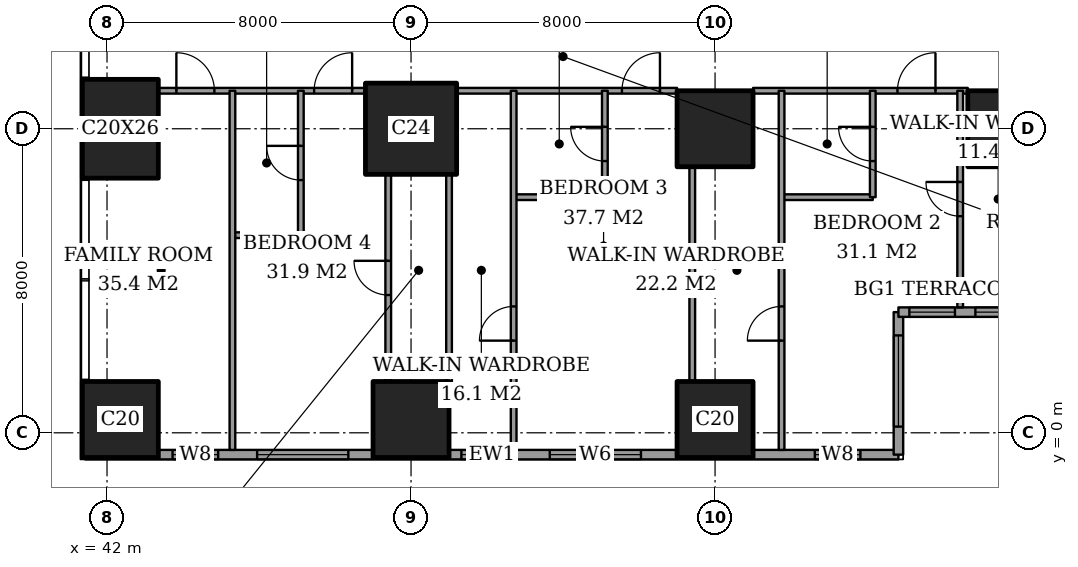
"""IFC4 building model, lengths in metres.
Left out: names, types, materials, properties, quantities, classifications, styles, units other than length and angle.
Written with IfcOpenShell. Run it as: python <this file> out.ifc"""

import sys

from ifc_helpers import new_model, si_unit, direction, frame, frame_2d, origin, origin_2d, place, context, subcontext, project, spatial, rectangle, extrude, element, fill, save


model = new_model("IFC4")
c1 = context("Model", 3, precision=1e-05, world=origin(), true_north=direction((0.0, 1.0)))
c2 = subcontext(c1, "Body", "Model", "MODEL_VIEW")
j1 = project(units=[si_unit("LENGTHUNIT", "METRE"), si_unit("PLANEANGLEUNIT", "RADIAN")], contexts=[c1])
p1 = place(None, origin())
s1 = spatial("IfcSite", under=j1, at=p1, CompositionType="ELEMENT")
p2 = place(p1, origin())
s2 = spatial("IfcBuilding", under=s1, at=p2, CompositionType="ELEMENT")
p3 = place(p2, frame((0.0, 0.0, 47.6)))
s3 = spatial("IfcBuildingStorey", under=s2, at=p3, CompositionType="ELEMENT", Elevation=47.6)
p4 = place(p3, frame((42.35, 0.35, 0.0), z_axis=(0.0, 0.0, 1.0), x_axis=(1.0, 0.0, 0.0)))
e1 = element("IfcColumn", 1, at=p4, inside=s3, PredefinedType="COLUMN", context=c2, shape_type="SweptSolid", body=[
    extrude(rectangle(XDim=2.0, YDim=2.0, at=origin_2d()), origin(), (0.0, 0.0, 1.0), 3.6),
])
p5 = place(p3, frame((42.35, 8.0, 0.0), z_axis=(0.0, 0.0, 1.0), x_axis=(1.0, 0.0, 0.0)))
e2 = element("IfcColumn", 2, at=p5, inside=s3, PredefinedType="COLUMN", context=c2, shape_type="SweptSolid", body=[
    extrude(rectangle(XDim=2.0, YDim=2.6, at=origin_2d()), origin(), (0.0, 0.0, 1.0), 3.6),
])
p6 = place(p3, frame((50.0, 0.35, 0.0), z_axis=(0.0, 0.0, 1.0), x_axis=(1.0, 0.0, 0.0)))
e3 = element("IfcColumn", 3, at=p6, inside=s3, PredefinedType="COLUMN", context=c2, shape_type="SweptSolid", body=[
    extrude(rectangle(XDim=2.0, YDim=2.0, at=origin_2d()), origin(), (0.0, 0.0, 1.0), 3.6),
])
p7 = place(p3, frame((50.0, 8.0, 0.0), z_axis=(0.0, 0.0, 1.0), x_axis=(1.0, 0.0, 0.0)))
e4 = element("IfcColumn", 4, at=p7, inside=s3, PredefinedType="COLUMN", context=c2, shape_type="SweptSolid", body=[
    extrude(rectangle(XDim=2.4, YDim=2.4, at=origin_2d()), origin(), (0.0, 0.0, 1.0), 3.6),
])
for number, where, z_axis, x_axis in (
    (5, (58.0, 0.35, 0.0), (0.0, 0.0, 1.0), (1.0, 0.0, 0.0)),
    (6, (58.0, 8.0, 0.0), (0.0, 0.0, 1.0), (1.0, 0.0, 0.0)),
    (7, (65.65, 8.0, 0.0), (0.0, 0.0, 1.0), (1.0, 0.0, 0.0)),
):
    element("IfcColumn", number, at=place(p3, frame(where, z_axis=z_axis, x_axis=x_axis)), inside=s3, PredefinedType="COLUMN", context=c2, shape_type="SweptSolid", body=[
        extrude(rectangle(XDim=2.0, YDim=2.0, at=origin_2d()), origin(), (0.0, 0.0, 1.0), 3.6),
    ])
p8 = place(p3, frame((41.425, -0.575, 0.0), z_axis=(0.0, 0.0, 1.0), x_axis=(1.0, 0.0, 0.0)))
e8 = element("IfcWall", 8, at=p8, inside=s3, PredefinedType="SOLIDWALL", context=c2, shape_type="SweptSolid", body=[
    extrude(rectangle(XDim=21.4, YDim=0.25, at=frame_2d((10.7, 0.0))), origin(), (0.0, 0.0, 1.0), 3.6),
])
p9 = place(p8, frame((2.3, 0.0, 0.6)))
e9 = element("IfcOpeningElement", 9, at=p9, cuts=e8, PredefinedType="OPENING", context=c2, shape_type="SweptSolid", body=[
    extrude(rectangle(XDim=1.2, YDim=2.0, at=frame_2d((0.6, 1.0))), frame((0.0, 0.135, 0.0), z_axis=(0.0, -1.0, 0.0), x_axis=(1.0, 0.0, 0.0)), (0.0, 0.0, 1.0), 0.27),
])
p10 = place(p8, frame((4.525, 0.0, 0.6)))
e10 = element("IfcOpeningElement", 10, at=p10, cuts=e8, PredefinedType="OPENING", context=c2, shape_type="SweptSolid", body=[
    extrude(rectangle(XDim=2.4, YDim=2.0, at=frame_2d((1.2, 1.0))), frame((0.0, 0.135, 0.0), z_axis=(0.0, -1.0, 0.0), x_axis=(1.0, 0.0, 0.0)), (0.0, 0.0, 1.0), 0.27),
])
p11 = place(p8, frame((9.9, 0.0, 0.6)))
e11 = element("IfcOpeningElement", 11, at=p11, cuts=e8, PredefinedType="OPENING", context=c2, shape_type="SweptSolid", body=[
    extrude(rectangle(XDim=1.2, YDim=2.0, at=frame_2d((0.6, 1.0))), frame((0.0, 0.135, 0.0), z_axis=(0.0, -1.0, 0.0), x_axis=(1.0, 0.0, 0.0)), (0.0, 0.0, 1.0), 0.27),
])
p12 = place(p8, frame((12.225, 0.0, 0.6)))
e12 = element("IfcOpeningElement", 12, at=p12, cuts=e8, PredefinedType="OPENING", context=c2, shape_type="SweptSolid", body=[
    extrude(rectangle(XDim=2.4, YDim=2.0, at=frame_2d((1.2, 1.0))), frame((0.0, 0.135, 0.0), z_axis=(0.0, -1.0, 0.0), x_axis=(1.0, 0.0, 0.0)), (0.0, 0.0, 1.0), 0.27),
])
p13 = place(p8, frame((19.2, 0.0, 0.6)))
e13 = element("IfcOpeningElement", 13, at=p13, cuts=e8, PredefinedType="OPENING", context=c2, shape_type="SweptSolid", body=[
    extrude(rectangle(XDim=1.2, YDim=2.0, at=frame_2d((0.6, 1.0))), frame((0.0, 0.135, 0.0), z_axis=(0.0, -1.0, 0.0), x_axis=(1.0, 0.0, 0.0)), (0.0, 0.0, 1.0), 0.27),
])
p14 = place(p3, frame((62.825, -0.575, 0.0), z_axis=(0.0, 0.0, 1.0), x_axis=(0.0, 1.0, 0.0)))
e14 = element("IfcWall", 14, at=p14, inside=s3, PredefinedType="SOLIDWALL", context=c2, shape_type="SweptSolid", body=[
    extrude(rectangle(XDim=3.75, YDim=0.25, at=frame_2d((1.875, 0.0))), origin(), (0.0, 0.0, 1.0), 3.6),
])
p15 = place(p14, frame((0.738, 0.0, 0.6)))
e15 = element("IfcOpeningElement", 15, at=p15, cuts=e14, PredefinedType="OPENING", context=c2, shape_type="SweptSolid", body=[
    extrude(rectangle(XDim=2.4, YDim=2.0, at=frame_2d((1.2, 1.0))), frame((0.0, 0.135, 0.0), z_axis=(0.0, -1.0, 0.0), x_axis=(1.0, 0.0, 0.0)), (0.0, 0.0, 1.0), 0.27),
])
p16 = place(p3, frame((62.825, 3.175, 0.0), z_axis=(0.0, 0.0, 1.0), x_axis=(1.0, 0.0, 0.0)))
e16 = element("IfcWall", 16, at=p16, inside=s3, PredefinedType="SOLIDWALL", context=c2, shape_type="SweptSolid", body=[
    extrude(rectangle(XDim=3.75, YDim=0.25, at=frame_2d((1.875, 0.0))), origin(), (0.0, 0.0, 1.0), 3.6),
])
p17 = place(p16, frame((0.288, 0.0, 0.6)))
e17 = element("IfcOpeningElement", 17, at=p17, cuts=e16, PredefinedType="OPENING", context=c2, shape_type="SweptSolid", body=[
    extrude(rectangle(XDim=1.2, YDim=2.0, at=frame_2d((0.6, 1.0))), frame((0.0, 0.135, 0.0), z_axis=(0.0, -1.0, 0.0), x_axis=(1.0, 0.0, 0.0)), (0.0, 0.0, 1.0), 0.27),
])
p18 = place(p16, frame((2.025, 0.0, 0.6)))
e18 = element("IfcOpeningElement", 18, at=p18, cuts=e16, PredefinedType="OPENING", context=c2, shape_type="SweptSolid", body=[
    extrude(rectangle(XDim=1.2, YDim=2.0, at=frame_2d((0.6, 1.0))), frame((0.0, 0.135, 0.0), z_axis=(0.0, -1.0, 0.0), x_axis=(1.0, 0.0, 0.0)), (0.0, 0.0, 1.0), 0.27),
])
p19 = place(p3, frame((45.3, 5.2, 0.0), z_axis=(0.0, 0.0, 1.0), x_axis=(1.0, 0.0, 0.0)))
e19 = element("IfcWall", 19, at=p19, inside=s3, PredefinedType="PARTITIONING", context=c2, shape_type="SweptSolid", body=[
    extrude(rectangle(XDim=1.8, YDim=0.15, at=frame_2d((0.9, 0.0))), origin(), (0.0, 0.0, 1.0), 3.35),
])
p20 = place(p3, frame((52.7, 6.2, 0.0), z_axis=(0.0, 0.0, 1.0), x_axis=(1.0, 0.0, 0.0)))
e20 = element("IfcWall", 20, at=p20, inside=s3, PredefinedType="PARTITIONING", context=c2, shape_type="SweptSolid", body=[
    extrude(rectangle(XDim=2.4, YDim=0.15, at=frame_2d((1.2, 0.0))), origin(), (0.0, 0.0, 1.0), 3.35),
])
p21 = place(p3, frame((59.75, 6.2, 0.0), z_axis=(0.0, 0.0, 1.0), x_axis=(1.0, 0.0, 0.0)))
e21 = element("IfcWall", 21, at=p21, inside=s3, PredefinedType="PARTITIONING", context=c2, shape_type="SweptSolid", body=[
    extrude(rectangle(XDim=2.4, YDim=0.15, at=frame_2d((1.2, 0.0))), origin(), (0.0, 0.0, 1.0), 3.35),
])
p22 = place(p3, frame((43.35, 9.0, 0.0), z_axis=(0.0, 0.0, 1.0), x_axis=(1.0, 0.0, 0.0)))
e22 = element("IfcWall", 22, at=p22, inside=s3, PredefinedType="PARTITIONING", context=c2, shape_type="SweptSolid", body=[
    extrude(rectangle(XDim=5.45, YDim=0.15, at=frame_2d((2.725, 0.0))), origin(), (0.0, 0.0, 1.0), 3.35),
])
p23 = place(p22, frame((4.1, 0.0, 0.0)))
e23 = element("IfcOpeningElement", 23, at=p23, cuts=e22, PredefinedType="OPENING", context=c2, shape_type="SweptSolid", body=[
    extrude(rectangle(XDim=1.0, YDim=2.1, at=frame_2d((0.5, 1.05))), frame((0.0, 0.085, 0.0), z_axis=(0.0, -1.0, 0.0), x_axis=(1.0, 0.0, 0.0)), (0.0, 0.0, 1.0), 0.17),
])
p24 = place(p22, frame((0.475, 0.0, 0.0)))
e24 = element("IfcOpeningElement", 24, at=p24, cuts=e22, PredefinedType="OPENING", context=c2, shape_type="SweptSolid", body=[
    extrude(rectangle(XDim=1.0, YDim=2.1, at=frame_2d((0.5, 1.05))), frame((0.0, 0.085, 0.0), z_axis=(0.0, -1.0, 0.0), x_axis=(1.0, 0.0, 0.0)), (0.0, 0.0, 1.0), 0.17),
])
p25 = place(p3, frame((51.2, 9.0, 0.0), z_axis=(0.0, 0.0, 1.0), x_axis=(1.0, 0.0, 0.0)))
e25 = element("IfcWall", 25, at=p25, inside=s3, PredefinedType="PARTITIONING", context=c2, shape_type="SweptSolid", body=[
    extrude(rectangle(XDim=5.8, YDim=0.15, at=frame_2d((2.9, 0.0))), origin(), (0.0, 0.0, 1.0), 3.35),
])
p26 = place(p25, frame((4.35, 0.0, 0.0)))
e26 = element("IfcOpeningElement", 26, at=p26, cuts=e25, PredefinedType="OPENING", context=c2, shape_type="SweptSolid", body=[
    extrude(rectangle(XDim=1.0, YDim=2.1, at=frame_2d((0.5, 1.05))), frame((0.0, 0.085, 0.0), z_axis=(0.0, -1.0, 0.0), x_axis=(1.0, 0.0, 0.0)), (0.0, 0.0, 1.0), 0.17),
])
p27 = place(p3, frame((59.0, 9.0, 0.0), z_axis=(0.0, 0.0, 1.0), x_axis=(1.0, 0.0, 0.0)))
e27 = element("IfcWall", 27, at=p27, inside=s3, PredefinedType="PARTITIONING", context=c2, shape_type="SweptSolid", body=[
    extrude(rectangle(XDim=5.65, YDim=0.15, at=frame_2d((2.825, 0.0))), origin(), (0.0, 0.0, 1.0), 3.35),
])
p28 = place(p27, frame((3.8, 0.0, 0.0)))
e28 = element("IfcOpeningElement", 28, at=p28, cuts=e27, PredefinedType="OPENING", context=c2, shape_type="SweptSolid", body=[
    extrude(rectangle(XDim=1.0, YDim=2.1, at=frame_2d((0.5, 1.05))), frame((0.0, 0.085, 0.0), z_axis=(0.0, -1.0, 0.0), x_axis=(1.0, 0.0, 0.0)), (0.0, 0.0, 1.0), 0.17),
])
p29 = place(p3, frame((45.3, -0.45, 0.0), z_axis=(0.0, 0.0, 1.0), x_axis=(0.0, 1.0, 0.0)))
e29 = element("IfcWall", 29, at=p29, inside=s3, PredefinedType="PARTITIONING", context=c2, shape_type="SweptSolid", body=[
    extrude(rectangle(XDim=9.45, YDim=0.15, at=frame_2d((4.725, 0.0))), origin(), (0.0, 0.0, 1.0), 3.35),
])
p30 = place(p3, frame((47.1, 5.2, 0.0), z_axis=(0.0, 0.0, 1.0), x_axis=(0.0, 1.0, 0.0)))
e30 = element("IfcWall", 30, at=p30, inside=s3, PredefinedType="PARTITIONING", context=c2, shape_type="SweptSolid", body=[
    extrude(rectangle(XDim=3.8, YDim=0.15, at=frame_2d((1.9, 0.0))), origin(), (0.0, 0.0, 1.0), 3.35),
])
p31 = place(p30, frame((1.45, 0.0, 0.0)))
e31 = element("IfcOpeningElement", 31, at=p31, cuts=e30, PredefinedType="OPENING", context=c2, shape_type="SweptSolid", body=[
    extrude(rectangle(XDim=0.9, YDim=2.1, at=frame_2d((0.45, 1.05))), frame((0.0, 0.085, 0.0), z_axis=(0.0, -1.0, 0.0), x_axis=(1.0, 0.0, 0.0)), (0.0, 0.0, 1.0), 0.17),
])
p32 = place(p3, frame((49.4, 1.35, 0.0), z_axis=(0.0, 0.0, 1.0), x_axis=(0.0, 1.0, 0.0)))
e32 = element("IfcWall", 32, at=p32, inside=s3, PredefinedType="PARTITIONING", context=c2, shape_type="SweptSolid", body=[
    extrude(rectangle(XDim=5.45, YDim=0.15, at=frame_2d((2.725, 0.0))), origin(), (0.0, 0.0, 1.0), 3.35),
])
p33 = place(p32, frame((2.275, 0.0, 0.0)))
e33 = element("IfcOpeningElement", 33, at=p33, cuts=e32, PredefinedType="OPENING", context=c2, shape_type="SweptSolid", body=[
    extrude(rectangle(XDim=0.9, YDim=2.1, at=frame_2d((0.45, 1.05))), frame((0.0, 0.085, 0.0), z_axis=(0.0, -1.0, 0.0), x_axis=(1.0, 0.0, 0.0)), (0.0, 0.0, 1.0), 0.17),
])
p34 = place(p3, frame((51.0, 1.35, 0.0), z_axis=(0.0, 0.0, 1.0), x_axis=(0.0, 1.0, 0.0)))
e34 = element("IfcWall", 34, at=p34, inside=s3, PredefinedType="PARTITIONING", context=c2, shape_type="SweptSolid", body=[
    extrude(rectangle(XDim=5.45, YDim=0.15, at=frame_2d((2.725, 0.0))), origin(), (0.0, 0.0, 1.0), 3.35),
])
p35 = place(p3, frame((52.7, -0.45, 0.0), z_axis=(0.0, 0.0, 1.0), x_axis=(0.0, 1.0, 0.0)))
e35 = element("IfcWall", 35, at=p35, inside=s3, PredefinedType="PARTITIONING", context=c2, shape_type="SweptSolid", body=[
    extrude(rectangle(XDim=9.45, YDim=0.15, at=frame_2d((4.725, 0.0))), origin(), (0.0, 0.0, 1.0), 3.35),
])
p36 = place(p35, frame((2.875, 0.0, 0.0)))
e36 = element("IfcOpeningElement", 36, at=p36, cuts=e35, PredefinedType="OPENING", context=c2, shape_type="SweptSolid", body=[
    extrude(rectangle(XDim=0.9, YDim=2.1, at=frame_2d((0.45, 1.05))), frame((0.0, 0.085, 0.0), z_axis=(0.0, -1.0, 0.0), x_axis=(1.0, 0.0, 0.0)), (0.0, 0.0, 1.0), 0.17),
])
p37 = place(p3, frame((55.1, 6.2, 0.0), z_axis=(0.0, 0.0, 1.0), x_axis=(0.0, 1.0, 0.0)))
e37 = element("IfcWall", 37, at=p37, inside=s3, PredefinedType="PARTITIONING", context=c2, shape_type="SweptSolid", body=[
    extrude(rectangle(XDim=2.8, YDim=0.15, at=frame_2d((1.4, 0.0))), origin(), (0.0, 0.0, 1.0), 3.35),
])
p38 = place(p37, frame((0.95, 0.0, 0.0)))
e38 = element("IfcOpeningElement", 38, at=p38, cuts=e37, PredefinedType="OPENING", context=c2, shape_type="SweptSolid", body=[
    extrude(rectangle(XDim=0.9, YDim=2.1, at=frame_2d((0.45, 1.05))), frame((0.0, 0.085, 0.0), z_axis=(0.0, -1.0, 0.0), x_axis=(1.0, 0.0, 0.0)), (0.0, 0.0, 1.0), 0.17),
])
p39 = place(p3, frame((57.4, 1.35, 0.0), z_axis=(0.0, 0.0, 1.0), x_axis=(0.0, 1.0, 0.0)))
e39 = element("IfcWall", 39, at=p39, inside=s3, PredefinedType="PARTITIONING", context=c2, shape_type="SweptSolid", body=[
    extrude(rectangle(XDim=5.65, YDim=0.15, at=frame_2d((2.825, 0.0))), origin(), (0.0, 0.0, 1.0), 3.35),
])
p40 = place(p3, frame((59.75, -0.45, 0.0), z_axis=(0.0, 0.0, 1.0), x_axis=(0.0, 1.0, 0.0)))
e40 = element("IfcWall", 40, at=p40, inside=s3, PredefinedType="PARTITIONING", context=c2, shape_type="SweptSolid", body=[
    extrude(rectangle(XDim=9.45, YDim=0.15, at=frame_2d((4.725, 0.0))), origin(), (0.0, 0.0, 1.0), 3.35),
])
p41 = place(p40, frame((2.875, 0.0, 0.0)))
e41 = element("IfcOpeningElement", 41, at=p41, cuts=e40, PredefinedType="OPENING", context=c2, shape_type="SweptSolid", body=[
    extrude(rectangle(XDim=0.9, YDim=2.1, at=frame_2d((0.45, 1.05))), frame((0.0, 0.085, 0.0), z_axis=(0.0, -1.0, 0.0), x_axis=(1.0, 0.0, 0.0)), (0.0, 0.0, 1.0), 0.17),
])
p42 = place(p3, frame((62.15, 6.2, 0.0), z_axis=(0.0, 0.0, 1.0), x_axis=(0.0, 1.0, 0.0)))
e42 = element("IfcWall", 42, at=p42, inside=s3, PredefinedType="PARTITIONING", context=c2, shape_type="SweptSolid", body=[
    extrude(rectangle(XDim=2.8, YDim=0.15, at=frame_2d((1.4, 0.0))), origin(), (0.0, 0.0, 1.0), 3.35),
])
p43 = place(p42, frame((0.95, 0.0, 0.0)))
e43 = element("IfcOpeningElement", 43, at=p43, cuts=e42, PredefinedType="OPENING", context=c2, shape_type="SweptSolid", body=[
    extrude(rectangle(XDim=0.9, YDim=2.1, at=frame_2d((0.45, 1.05))), frame((0.0, 0.085, 0.0), z_axis=(0.0, -1.0, 0.0), x_axis=(1.0, 0.0, 0.0)), (0.0, 0.0, 1.0), 0.17),
])
p44 = place(p3, frame((64.45, 3.3, 0.0), z_axis=(0.0, 0.0, 1.0), x_axis=(0.0, 1.0, 0.0)))
e44 = element("IfcWall", 44, at=p44, inside=s3, PredefinedType="PARTITIONING", context=c2, shape_type="SweptSolid", body=[
    extrude(rectangle(XDim=5.7, YDim=0.15, at=frame_2d((2.85, 0.0))), origin(), (0.0, 0.0, 1.0), 3.35),
])
p45 = place(p44, frame((2.4, 0.0, 0.0)))
e45 = element("IfcOpeningElement", 45, at=p45, cuts=e44, PredefinedType="OPENING", context=c2, shape_type="SweptSolid", body=[
    extrude(rectangle(XDim=0.9, YDim=2.1, at=frame_2d((0.45, 1.05))), frame((0.0, 0.085, 0.0), z_axis=(0.0, -1.0, 0.0), x_axis=(1.0, 0.0, 0.0)), (0.0, 0.0, 1.0), 0.17),
])
p46 = place(p9, origin())
e46 = element("IfcWindow", 46, at=p46, inside=s3, PartitioningType="SINGLE_PANEL", PredefinedType="WINDOW", context=c2, shape_type="SweptSolid", body=[
    extrude(rectangle(XDim=1.2, YDim=2.0, at=frame_2d((0.6, 1.0))), frame((0.0, 0.03, 0.0), z_axis=(0.0, -1.0, 0.0), x_axis=(1.0, 0.0, 0.0)), (0.0, 0.0, 1.0), 0.06),
])
fill(e9, e46)
p47 = place(p10, origin())
e47 = element("IfcWindow", 47, at=p47, inside=s3, PartitioningType="SINGLE_PANEL", PredefinedType="WINDOW", context=c2, shape_type="SweptSolid", body=[
    extrude(rectangle(XDim=2.4, YDim=2.0, at=frame_2d((1.2, 1.0))), frame((0.0, 0.03, 0.0), z_axis=(0.0, -1.0, 0.0), x_axis=(1.0, 0.0, 0.0)), (0.0, 0.0, 1.0), 0.06),
])
fill(e10, e47)
p48 = place(p11, origin())
e48 = element("IfcWindow", 48, at=p48, inside=s3, PartitioningType="SINGLE_PANEL", PredefinedType="WINDOW", context=c2, shape_type="SweptSolid", body=[
    extrude(rectangle(XDim=1.2, YDim=2.0, at=frame_2d((0.6, 1.0))), frame((0.0, 0.03, 0.0), z_axis=(0.0, -1.0, 0.0), x_axis=(1.0, 0.0, 0.0)), (0.0, 0.0, 1.0), 0.06),
])
fill(e11, e48)
p49 = place(p12, origin())
e49 = element("IfcWindow", 49, at=p49, inside=s3, PartitioningType="SINGLE_PANEL", PredefinedType="WINDOW", context=c2, shape_type="SweptSolid", body=[
    extrude(rectangle(XDim=2.4, YDim=2.0, at=frame_2d((1.2, 1.0))), frame((0.0, 0.03, 0.0), z_axis=(0.0, -1.0, 0.0), x_axis=(1.0, 0.0, 0.0)), (0.0, 0.0, 1.0), 0.06),
])
fill(e12, e49)
p50 = place(p13, origin())
e50 = element("IfcWindow", 50, at=p50, inside=s3, PartitioningType="SINGLE_PANEL", PredefinedType="WINDOW", context=c2, shape_type="SweptSolid", body=[
    extrude(rectangle(XDim=1.2, YDim=2.0, at=frame_2d((0.6, 1.0))), frame((0.0, 0.03, 0.0), z_axis=(0.0, -1.0, 0.0), x_axis=(1.0, 0.0, 0.0)), (0.0, 0.0, 1.0), 0.06),
])
fill(e13, e50)
p51 = place(p15, origin())
e51 = element("IfcWindow", 51, at=p51, inside=s3, PartitioningType="SINGLE_PANEL", PredefinedType="WINDOW", context=c2, shape_type="SweptSolid", body=[
    extrude(rectangle(XDim=2.4, YDim=2.0, at=frame_2d((1.2, 1.0))), frame((0.0, 0.03, 0.0), z_axis=(0.0, -1.0, 0.0), x_axis=(1.0, 0.0, 0.0)), (0.0, 0.0, 1.0), 0.06),
])
fill(e15, e51)
p52 = place(p17, origin())
e52 = element("IfcWindow", 52, at=p52, inside=s3, PartitioningType="SINGLE_PANEL", PredefinedType="WINDOW", context=c2, shape_type="SweptSolid", body=[
    extrude(rectangle(XDim=1.2, YDim=2.0, at=frame_2d((0.6, 1.0))), frame((0.0, 0.03, 0.0), z_axis=(0.0, -1.0, 0.0), x_axis=(1.0, 0.0, 0.0)), (0.0, 0.0, 1.0), 0.06),
])
fill(e17, e52)
p53 = place(p18, origin())
e53 = element("IfcWindow", 53, at=p53, inside=s3, PartitioningType="SINGLE_PANEL", PredefinedType="WINDOW", context=c2, shape_type="SweptSolid", body=[
    extrude(rectangle(XDim=1.2, YDim=2.0, at=frame_2d((0.6, 1.0))), frame((0.0, 0.03, 0.0), z_axis=(0.0, -1.0, 0.0), x_axis=(1.0, 0.0, 0.0)), (0.0, 0.0, 1.0), 0.06),
])
fill(e18, e53)
p54 = place(p45, origin())
e54 = element("IfcDoor", 54, at=p54, inside=s3, OperationType="SINGLE_SWING_LEFT", PredefinedType="DOOR", context=c2, shape_type="SweptSolid", body=[
    extrude(rectangle(XDim=0.9, YDim=2.1, at=frame_2d((0.45, 1.05))), frame((0.0, 0.025, 0.0), z_axis=(0.0, -1.0, 0.0), x_axis=(1.0, 0.0, 0.0)), (0.0, 0.0, 1.0), 0.05),
])
fill(e45, e54)
p55 = place(p43, origin())
e55 = element("IfcDoor", 55, at=p55, inside=s3, OperationType="SINGLE_SWING_LEFT", PredefinedType="DOOR", context=c2, shape_type="SweptSolid", body=[
    extrude(rectangle(XDim=0.9, YDim=2.1, at=frame_2d((0.45, 1.05))), frame((0.0, 0.025, 0.0), z_axis=(0.0, -1.0, 0.0), x_axis=(1.0, 0.0, 0.0)), (0.0, 0.0, 1.0), 0.05),
])
fill(e43, e55)
p56 = place(p28, origin())
e56 = element("IfcDoor", 56, at=p56, inside=s3, OperationType="SINGLE_SWING_LEFT", PredefinedType="DOOR", context=c2, shape_type="SweptSolid", body=[
    extrude(rectangle(XDim=1.0, YDim=2.1, at=frame_2d((0.5, 1.05))), frame((0.0, 0.025, 0.0), z_axis=(0.0, -1.0, 0.0), x_axis=(1.0, 0.0, 0.0)), (0.0, 0.0, 1.0), 0.05),
])
fill(e28, e56)
p57 = place(p41, origin())
e57 = element("IfcDoor", 57, at=p57, inside=s3, OperationType="SINGLE_SWING_RIGHT", PredefinedType="DOOR", context=c2, shape_type="SweptSolid", body=[
    extrude(rectangle(XDim=0.9, YDim=2.1, at=frame_2d((0.45, 1.05))), frame((0.0, 0.025, 0.0), z_axis=(0.0, -1.0, 0.0), x_axis=(1.0, 0.0, 0.0)), (0.0, 0.0, 1.0), 0.05),
])
fill(e41, e57)
p58 = place(p38, origin())
e58 = element("IfcDoor", 58, at=p58, inside=s3, OperationType="SINGLE_SWING_LEFT", PredefinedType="DOOR", context=c2, shape_type="SweptSolid", body=[
    extrude(rectangle(XDim=0.9, YDim=2.1, at=frame_2d((0.45, 1.05))), frame((0.0, 0.025, 0.0), z_axis=(0.0, -1.0, 0.0), x_axis=(1.0, 0.0, 0.0)), (0.0, 0.0, 1.0), 0.05),
])
fill(e38, e58)
p59 = place(p26, origin())
e59 = element("IfcDoor", 59, at=p59, inside=s3, OperationType="SINGLE_SWING_LEFT", PredefinedType="DOOR", context=c2, shape_type="SweptSolid", body=[
    extrude(rectangle(XDim=1.0, YDim=2.1, at=frame_2d((0.5, 1.05))), frame((0.0, 0.025, 0.0), z_axis=(0.0, -1.0, 0.0), x_axis=(1.0, 0.0, 0.0)), (0.0, 0.0, 1.0), 0.05),
])
fill(e26, e59)
p60 = place(p36, origin())
e60 = element("IfcDoor", 60, at=p60, inside=s3, OperationType="SINGLE_SWING_RIGHT", PredefinedType="DOOR", context=c2, shape_type="SweptSolid", body=[
    extrude(rectangle(XDim=0.9, YDim=2.1, at=frame_2d((0.45, 1.05))), frame((0.0, 0.025, 0.0), z_axis=(0.0, -1.0, 0.0), x_axis=(1.0, 0.0, 0.0)), (0.0, 0.0, 1.0), 0.05),
])
fill(e36, e60)
p61 = place(p33, origin())
e61 = element("IfcDoor", 61, at=p61, inside=s3, OperationType="SINGLE_SWING_LEFT", PredefinedType="DOOR", context=c2, shape_type="SweptSolid", body=[
    extrude(rectangle(XDim=0.9, YDim=2.1, at=frame_2d((0.45, 1.05))), frame((0.0, 0.025, 0.0), z_axis=(0.0, -1.0, 0.0), x_axis=(1.0, 0.0, 0.0)), (0.0, 0.0, 1.0), 0.05),
])
fill(e33, e61)
p62 = place(p31, origin())
e62 = element("IfcDoor", 62, at=p62, inside=s3, OperationType="SINGLE_SWING_LEFT", PredefinedType="DOOR", context=c2, shape_type="SweptSolid", body=[
    extrude(rectangle(XDim=0.9, YDim=2.1, at=frame_2d((0.45, 1.05))), frame((0.0, 0.025, 0.0), z_axis=(0.0, -1.0, 0.0), x_axis=(1.0, 0.0, 0.0)), (0.0, 0.0, 1.0), 0.05),
])
fill(e31, e62)
p63 = place(p23, origin())
e63 = element("IfcDoor", 63, at=p63, inside=s3, OperationType="SINGLE_SWING_LEFT", PredefinedType="DOOR", context=c2, shape_type="SweptSolid", body=[
    extrude(rectangle(XDim=1.0, YDim=2.1, at=frame_2d((0.5, 1.05))), frame((0.0, 0.025, 0.0), z_axis=(0.0, -1.0, 0.0), x_axis=(1.0, 0.0, 0.0)), (0.0, 0.0, 1.0), 0.05),
])
fill(e23, e63)
p64 = place(p24, origin())
e64 = element("IfcDoor", 64, at=p64, inside=s3, OperationType="SINGLE_SWING_RIGHT", PredefinedType="DOOR", context=c2, shape_type="SweptSolid", body=[
    extrude(rectangle(XDim=1.0, YDim=2.1, at=frame_2d((0.5, 1.05))), frame((0.0, 0.025, 0.0), z_axis=(0.0, -1.0, 0.0), x_axis=(1.0, 0.0, 0.0)), (0.0, 0.0, 1.0), 0.05),
])
fill(e24, e64)
save(model, sys.argv[1])
